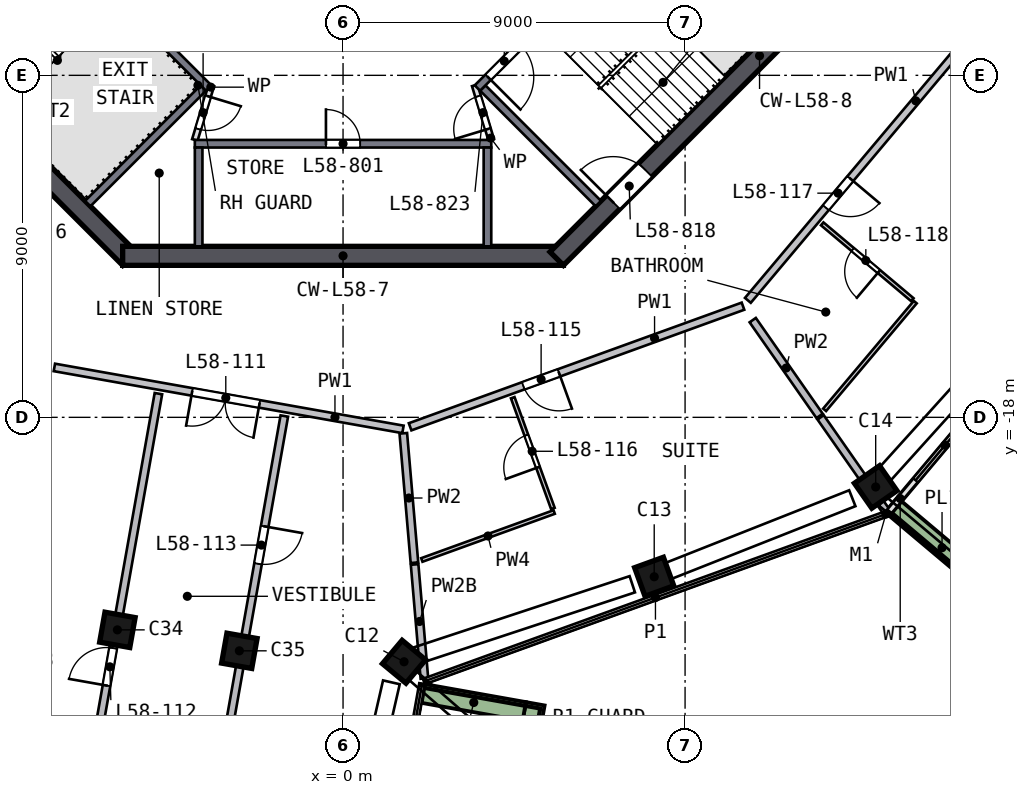
"""IFC4 building model, lengths in metres.
Left out: names, types, materials, properties, quantities, classifications, styles, units other than length and angle.
Written with IfcOpenShell. Run it as: python <this file> out.ifc"""

import sys

from ifc_helpers import new_model, si_unit, direction, frame, frame_2d, origin, origin_2d, place, context, subcontext, project, spatial, rectangle, extrude, element, fill, save


model = new_model("IFC4")
c1 = context("Model", 3, precision=1e-05, world=origin(), true_north=direction((0.0, 1.0)))
c2 = subcontext(c1, "Body", "Model", "MODEL_VIEW")
j1 = project(units=[si_unit("LENGTHUNIT", "METRE"), si_unit("PLANEANGLEUNIT", "RADIAN")], contexts=[c1])
p1 = place(None, origin())
s1 = spatial("IfcSite", under=j1, at=p1, CompositionType="ELEMENT")
p2 = place(p1, origin())
s2 = spatial("IfcBuilding", under=s1, at=p2, CompositionType="ELEMENT")
p3 = place(p2, frame((0.0, 0.0, 237.5)))
s3 = spatial("IfcBuildingStorey", under=s2, at=p3, CompositionType="ELEMENT", Elevation=237.5)
p4 = place(p3, frame((1.465, -24.442, 0.0), z_axis=(0.11614948, 0.007981476, 0.993199675), x_axis=(-0.636262461, -0.76725356, 0.080573294)))
e1 = element("IfcColumn", 1, at=p4, inside=s3, PredefinedType="COLUMN", context=c2, shape_type="SweptSolid", body=[
    extrude(rectangle(XDim=0.8, YDim=0.8, at=origin_2d()), origin(), (0.0, 0.0, 1.0), 3.212),
])
p5 = place(p3, frame((8.061, -22.243, 0.0), z_axis=(0.105478981, 0.039240919, 0.993646987), x_axis=(0.93419489, 0.338548583, -0.112537837)))
e2 = element("IfcColumn", 2, at=p5, inside=s3, PredefinedType="COLUMN", context=c2, shape_type="SweptSolid", body=[
    extrude(rectangle(XDim=0.8, YDim=0.8, at=origin_2d()), origin(), (0.0, 0.0, 1.0), 3.21),
])
for number, where, z_axis, x_axis in (
    (3, (13.902, -19.913, 0.0), (0.094, 0.067, 0.993), (-0.815, -0.568, 0.115)),
    (4, (-6.073, -23.559, 0.0), (0.112, -0.028, 0.993), (-0.176, -0.984, -0.008)),
    (5, (-2.867, -24.129, 0.0), (0.115, -0.013, 0.993), (-0.174, -0.985, 0.008)),
):
    element("IfcColumn", number, at=place(p3, frame(where, z_axis=z_axis, x_axis=x_axis)), inside=s3, PredefinedType="COLUMN", context=c2, shape_type="SweptSolid", body=[
        extrude(rectangle(XDim=0.8, YDim=0.8, at=origin_2d()), origin(), (0.0, 0.0, 1.0), 3.211),
    ])
p6 = place(p3, frame((-13.823, -5.622, 0.0), z_axis=(0.0, 0.0, 1.0), x_axis=(0.707106781, -0.707106781, 0.0)))
e6 = element("IfcWall", 6, at=p6, inside=s3, PredefinedType="SHEAR", context=c2, shape_type="SweptSolid", body=[
    extrude(rectangle(XDim=11.598, YDim=0.5, at=frame_2d((5.799, 0.0))), origin(), (0.0, 0.0, 1.0), 3.5),
])
p7 = place(p6, frame((2.099, 0.0, 0.0)))
e7 = element("IfcOpeningElement", 7, at=p7, cuts=e6, PredefinedType="OPENING", context=c2, shape_type="SweptSolid", body=[
    extrude(rectangle(XDim=1.2, YDim=2.1, at=frame_2d((0.6, 1.05))), frame((0.0, 0.26, 0.0), z_axis=(0.0, -1.0, 0.0), x_axis=(1.0, 0.0, 0.0)), (0.0, 0.0, 1.0), 0.52),
])
p8 = place(p3, frame((-5.799, -13.75, 0.0), z_axis=(0.0, 0.0, 1.0), x_axis=(1.0, 0.0, 0.0)))
e8 = element("IfcWall", 8, at=p8, inside=s3, PredefinedType="SHEAR", context=c2, shape_type="SweptSolid", body=[
    extrude(rectangle(XDim=11.598, YDim=0.5, at=frame_2d((5.799, 0.0))), origin(), (0.0, 0.0, 1.0), 3.5),
])
p9 = place(p3, frame((5.622, -13.823, 0.0), z_axis=(0.0, 0.0, 1.0), x_axis=(0.707106781, 0.707106781, 0.0)))
e9 = element("IfcWall", 9, at=p9, inside=s3, PredefinedType="SHEAR", context=c2, shape_type="SweptSolid", body=[
    extrude(rectangle(XDim=11.598, YDim=0.5, at=frame_2d((5.799, 0.0))), origin(), (0.0, 0.0, 1.0), 3.5),
])
p10 = place(p9, frame((2.099, 0.0, 0.0)))
e10 = element("IfcOpeningElement", 10, at=p10, cuts=e9, PredefinedType="OPENING", context=c2, shape_type="SweptSolid", body=[
    extrude(rectangle(XDim=1.2, YDim=2.1, at=frame_2d((0.6, 1.05))), frame((0.0, 0.26, 0.0), z_axis=(0.0, -1.0, 0.0), x_axis=(1.0, 0.0, 0.0)), (0.0, 0.0, 1.0), 0.52),
])
p11 = place(p3, frame((14.383, -20.467, 0.0), z_axis=(0.0, 0.0, 1.0), x_axis=(0.643863246, 0.765140589, 0.0)))
e11 = element("IfcWall", 11, at=p11, inside=s3, PredefinedType="SOLIDWALL", context=c2, shape_type="SweptSolid", body=[
    extrude(rectangle(XDim=3.863, YDim=0.15, at=frame_2d((1.932, 0.0))), origin(), (0.0, 0.0, 1.0), 2.525),
])
p12 = place(p11, frame((1.063, 0.0, 0.0)))
e12 = element("IfcOpeningElement", 12, at=p12, cuts=e11, PredefinedType="OPENING", context=c2, shape_type="SweptSolid", body=[
    extrude(rectangle(XDim=2.4, YDim=2.4, at=frame_2d((1.2, 1.2))), frame((0.0, 0.085, 0.0), z_axis=(0.0, -1.0, 0.0), x_axis=(1.0, 0.0, 0.0)), (0.0, 0.0, 1.0), 0.17),
])
p13 = place(p3, frame((3.512, -34.238, 0.0), z_axis=(0.0, 0.0, 1.0), x_axis=(0.175030359, 0.984563037, 0.0)))
e13 = element("IfcWall", 13, at=p13, inside=s3, PredefinedType="SOLIDWALL", context=c2, shape_type="SweptSolid", body=[
    extrude(rectangle(XDim=8.836, YDim=0.5, at=frame_2d((4.418, 0.0))), origin(), (0.0, 0.0, 1.0), 0.7),
])
p14 = place(p3, frame((4.769, -25.74, 0.0), z_axis=(0.0, 0.0, 1.0), x_axis=(-0.98456424, 0.175023592, 0.0)))
e14 = element("IfcWall", 14, at=p14, inside=s3, PredefinedType="SOLIDWALL", context=c2, shape_type="SweptSolid", body=[
    extrude(rectangle(XDim=2.699, YDim=0.5, at=frame_2d((1.35, 0.0))), origin(), (0.0, 0.0, 1.0), 0.7),
])
p15 = place(p3, frame((14.538, -20.402, 0.0), z_axis=(0.0, 0.0, 1.0), x_axis=(0.765134779, -0.64387015, 0.0)))
e15 = element("IfcWall", 15, at=p15, inside=s3, PredefinedType="SOLIDWALL", context=c2, shape_type="SweptSolid", body=[
    extrude(rectangle(XDim=3.199, YDim=0.5, at=frame_2d((1.6, 0.0))), origin(), (0.0, 0.0, 1.0), 0.7),
])
p16 = place(p3, frame((-3.9, -10.8, 0.0), z_axis=(0.0, 0.0, 1.0), x_axis=(1.0, 0.0, 0.0)))
e16 = element("IfcWall", 16, at=p16, inside=s3, PredefinedType="SOLIDWALL", context=c2, shape_type="SweptSolid", body=[
    extrude(rectangle(XDim=7.8, YDim=0.2, at=frame_2d((3.9, 0.0))), origin(), (0.0, 0.0, 1.0), 3.19),
])
p17 = place(p16, frame((3.45, 0.0, 0.0)))
e17 = element("IfcOpeningElement", 17, at=p17, cuts=e16, PredefinedType="OPENING", context=c2, shape_type="SweptSolid", body=[
    extrude(rectangle(XDim=0.9, YDim=2.1, at=frame_2d((0.45, 1.05))), frame((0.0, 0.11, 0.0), z_axis=(0.0, -1.0, 0.0), x_axis=(1.0, 0.0, 0.0)), (0.0, 0.0, 1.0), 0.22),
])
for number, where, z_axis, x_axis in (
    (18, (-3.8, -10.9, 0.0), (0.0, 0.0, 1.0), (0.0, -1.0, 0.0)),
    (19, (3.8, -10.9, 0.0), (0.0, 0.0, 1.0), (0.0, -1.0, 0.0)),
):
    element("IfcWall", number, at=place(p3, frame(where, z_axis=z_axis, x_axis=x_axis)), inside=s3, PredefinedType="SOLIDWALL", context=c2, shape_type="SweptSolid", body=[
        extrude(rectangle(XDim=2.6, YDim=0.2, at=frame_2d((1.3, 0.0))), origin(), (0.0, 0.0, 1.0), 3.19),
    ])
p18 = place(p3, frame((-3.535, -9.334, 0.0), z_axis=(0.0, 0.0, 1.0), x_axis=(-0.707120946, 0.707092617, 0.0)))
e20 = element("IfcWall", 20, at=p18, inside=s3, PredefinedType="SOLIDWALL", context=c2, shape_type="SweptSolid", body=[
    extrude(rectangle(XDim=8.618, YDim=0.2, at=frame_2d((4.309, 0.0))), origin(), (0.0, 0.0, 1.0), 3.19),
])
p19 = place(p18, frame((6.6, 0.0, 0.0)))
e21 = element("IfcOpeningElement", 21, at=p19, cuts=e20, PredefinedType="OPENING", context=c2, shape_type="SweptSolid", body=[
    extrude(rectangle(XDim=1.2, YDim=2.1, at=frame_2d((0.6, 1.05))), frame((0.0, 0.11, 0.0), z_axis=(0.0, -1.0, 0.0), x_axis=(1.0, 0.0, 0.0)), (0.0, 0.0, 1.0), 0.22),
])
p20 = place(p3, frame((-3.677, -9.334, 0.0), z_axis=(0.0, 0.0, 1.0), x_axis=(-0.707078393, -0.707135168, 0.0)))
e22 = element("IfcWall", 22, at=p20, inside=s3, PredefinedType="SOLIDWALL", context=c2, shape_type="SweptSolid", body=[
    extrude(rectangle(XDim=4.3, YDim=0.2, at=frame_2d((2.15, 0.0))), origin(), (0.0, 0.0, 1.0), 3.19),
])
p21 = place(p3, frame((9.629, -3.24, 0.0), z_axis=(0.0, 0.0, 1.0), x_axis=(-0.707120946, -0.707092617, 0.0)))
e23 = element("IfcWall", 23, at=p21, inside=s3, PredefinedType="SOLIDWALL", context=c2, shape_type="SweptSolid", body=[
    extrude(rectangle(XDim=8.618, YDim=0.2, at=frame_2d((4.309, 0.0))), origin(), (0.0, 0.0, 1.0), 3.19),
])
p22 = place(p21, frame((7.018, 0.0, 0.0)))
e24 = element("IfcOpeningElement", 24, at=p22, cuts=e23, PredefinedType="OPENING", context=c2, shape_type="SweptSolid", body=[
    extrude(rectangle(XDim=1.2, YDim=2.1, at=frame_2d((0.6, 1.05))), frame((0.0, 0.11, 0.0), z_axis=(0.0, -1.0, 0.0), x_axis=(1.0, 0.0, 0.0)), (0.0, 0.0, 1.0), 0.22),
])
p23 = place(p3, frame((3.677, -9.334, 0.0), z_axis=(0.0, 0.0, 1.0), x_axis=(0.707078393, -0.707135168, 0.0)))
e25 = element("IfcWall", 25, at=p23, inside=s3, PredefinedType="SOLIDWALL", context=c2, shape_type="SweptSolid", body=[
    extrude(rectangle(XDim=4.3, YDim=0.2, at=frame_2d((2.15, 0.0))), origin(), (0.0, 0.0, 1.0), 3.19),
])
p24 = place(p3, frame((-3.465, -9.263, 0.0), z_axis=(0.0, 0.0, 1.0), x_axis=(-0.289808785, -0.957084567, 0.0)))
e26 = element("IfcWall", 26, at=p24, inside=s3, PredefinedType="PARTITIONING", context=c2, shape_type="SweptSolid", body=[
    extrude(rectangle(XDim=1.501, YDim=0.15, at=frame_2d((0.75, 0.0))), origin(), (0.0, 0.0, 1.0), 3.19),
])
p25 = place(p24, frame((0.301, 0.0, 0.0)))
e27 = element("IfcOpeningElement", 27, at=p25, cuts=e26, PredefinedType="OPENING", context=c2, shape_type="SweptSolid", body=[
    extrude(rectangle(XDim=0.9, YDim=2.1, at=frame_2d((0.45, 1.05))), frame((0.0, 0.085, 0.0), z_axis=(0.0, -1.0, 0.0), x_axis=(1.0, 0.0, 0.0)), (0.0, 0.0, 1.0), 0.17),
])
p26 = place(p3, frame((3.9, -10.7, 0.0), z_axis=(0.0, 0.0, 1.0), x_axis=(-0.289808785, 0.957084567, 0.0)))
e28 = element("IfcWall", 28, at=p26, inside=s3, PredefinedType="PARTITIONING", context=c2, shape_type="SweptSolid", body=[
    extrude(rectangle(XDim=1.501, YDim=0.15, at=frame_2d((0.75, 0.0))), origin(), (0.0, 0.0, 1.0), 3.19),
])
p27 = place(p26, frame((0.301, 0.0, 0.0)))
e29 = element("IfcOpeningElement", 29, at=p27, cuts=e28, PredefinedType="OPENING", context=c2, shape_type="SweptSolid", body=[
    extrude(rectangle(XDim=0.9, YDim=2.1, at=frame_2d((0.45, 1.05))), frame((0.0, 0.085, 0.0), z_axis=(0.0, -1.0, 0.0), x_axis=(1.0, 0.0, 0.0)), (0.0, 0.0, 1.0), 0.17),
])
p28 = place(p3, frame((1.577, -18.317, 0.0), z_axis=(0.0, 0.0, 1.0), x_axis=(-0.984565418, 0.175016965, 0.0)))
e30 = element("IfcWall", 30, at=p28, inside=s3, PredefinedType="SOLIDWALL", context=c2, shape_type="SweptSolid", body=[
    extrude(rectangle(XDim=9.317, YDim=0.2, at=frame_2d((4.658, 0.0))), origin(), (0.0, 0.0, 1.0), 3.19),
])
p29 = place(p28, frame((3.835, 0.0, 0.0)))
e31 = element("IfcOpeningElement", 31, at=p29, cuts=e30, PredefinedType="OPENING", context=c2, shape_type="SweptSolid", body=[
    extrude(rectangle(XDim=1.8, YDim=2.1, at=frame_2d((0.9, 1.05))), frame((0.0, 0.11, 0.0), z_axis=(0.0, -1.0, 0.0), x_axis=(1.0, 0.0, 0.0)), (0.0, 0.0, 1.0), 0.22),
])
p30 = place(p3, frame((10.524, -15.075, 0.0), z_axis=(0.0, 0.0, 1.0), x_axis=(-0.940173108, -0.34069712, 0.0)))
e32 = element("IfcWall", 32, at=p30, inside=s3, PredefinedType="SOLIDWALL", context=c2, shape_type="SweptSolid", body=[
    extrude(rectangle(XDim=9.316, YDim=0.2, at=frame_2d((4.658, 0.0))), origin(), (0.0, 0.0, 1.0), 3.19),
])
p31 = place(p30, frame((5.15, 0.0, 0.0)))
e33 = element("IfcOpeningElement", 33, at=p31, cuts=e32, PredefinedType="OPENING", context=c2, shape_type="SweptSolid", body=[
    extrude(rectangle(XDim=1.0, YDim=2.1, at=frame_2d((0.5, 1.05))), frame((0.0, 0.11, 0.0), z_axis=(0.0, -1.0, 0.0), x_axis=(1.0, 0.0, 0.0)), (0.0, 0.0, 1.0), 0.22),
])
p32 = place(p3, frame((16.664, -7.778, 0.0), z_axis=(0.0, 0.0, 1.0), x_axis=(-0.643849849, -0.765151862, 0.0)))
e34 = element("IfcWall", 34, at=p32, inside=s3, PredefinedType="SOLIDWALL", context=c2, shape_type="SweptSolid", body=[
    extrude(rectangle(XDim=9.337, YDim=0.2, at=frame_2d((4.668, 0.0))), origin(), (0.0, 0.0, 1.0), 3.19),
])
p33 = place(p32, frame((5.15, 0.0, 0.0)))
e35 = element("IfcOpeningElement", 35, at=p33, cuts=e34, PredefinedType="OPENING", context=c2, shape_type="SweptSolid", body=[
    extrude(rectangle(XDim=1.0, YDim=2.1, at=frame_2d((0.5, 1.05))), frame((0.0, 0.11, 0.0), z_axis=(0.0, -1.0, 0.0), x_axis=(1.0, 0.0, 0.0)), (0.0, 0.0, 1.0), 0.22),
])
p34 = place(p3, frame((-6.662, -27.519, 0.0), z_axis=(0.0, 0.0, 1.0), x_axis=(0.175034356, 0.984562326, 0.0)))
e36 = element("IfcWall", 36, at=p34, inside=s3, PredefinedType="SOLIDWALL", context=c2, shape_type="SweptSolid", body=[
    extrude(rectangle(XDim=10.302, YDim=0.2, at=frame_2d((5.151, 0.0))), origin(), (0.0, 0.0, 1.0), 3.19),
])
p35 = place(p34, frame((2.5, 0.0, 0.0)))
e37 = element("IfcOpeningElement", 37, at=p35, cuts=e36, PredefinedType="OPENING", context=c2, shape_type="SweptSolid", body=[
    extrude(rectangle(XDim=1.0, YDim=2.1, at=frame_2d((0.5, 1.05))), frame((0.0, 0.11, 0.0), z_axis=(0.0, -1.0, 0.0), x_axis=(1.0, 0.0, 0.0)), (0.0, 0.0, 1.0), 0.22),
])
p36 = place(p3, frame((-1.545, -17.965, 0.0), z_axis=(0.0, 0.0, 1.0), x_axis=(-0.175011383, -0.98456641, 0.0)))
e38 = element("IfcWall", 38, at=p36, inside=s3, PredefinedType="SOLIDWALL", context=c2, shape_type="SweptSolid", body=[
    extrude(rectangle(XDim=10.302, YDim=0.2, at=frame_2d((5.151, 0.0))), origin(), (0.0, 0.0, 1.0), 3.19),
])
p37 = place(p36, frame((2.95, 0.0, 0.0)))
e39 = element("IfcOpeningElement", 39, at=p37, cuts=e38, PredefinedType="OPENING", context=c2, shape_type="SweptSolid", body=[
    extrude(rectangle(XDim=1.0, YDim=2.1, at=frame_2d((0.5, 1.05))), frame((0.0, 0.11, 0.0), z_axis=(0.0, -1.0, 0.0), x_axis=(1.0, 0.0, 0.0)), (0.0, 0.0, 1.0), 0.22),
])
p38 = place(p3, frame((1.586, -18.42, 0.0), z_axis=(0.0, 0.0, 1.0), x_axis=(0.08577589, -0.996314457, 0.0)))
e40 = element("IfcWall", 40, at=p38, inside=s3, PredefinedType="SOLIDWALL", context=c2, shape_type="SweptSolid", body=[
    extrude(rectangle(XDim=3.418, YDim=0.2, at=frame_2d((1.709, 0.0))), origin(), (0.0, 0.0, 1.0), 3.19),
])
p39 = place(p3, frame((1.883, -21.872, 0.0), z_axis=(0.0, 0.0, 1.0), x_axis=(0.085775953, -0.996314451, 0.0)))
e41 = element("IfcWall", 41, at=p39, inside=s3, PredefinedType="SOLIDWALL", context=c2, shape_type="SweptSolid", body=[
    extrude(rectangle(XDim=3.011, YDim=0.2, at=frame_2d((1.506, 0.0))), origin(), (0.0, 0.0, 1.0), 2.69),
])
p40 = place(p3, frame((10.78, -15.441, 0.0), z_axis=(0.0, 0.0, 1.0), x_axis=(0.572438677, -0.819947535, 0.0)))
e42 = element("IfcWall", 42, at=p40, inside=s3, PredefinedType="SOLIDWALL", context=c2, shape_type="SweptSolid", body=[
    extrude(rectangle(XDim=3.074, YDim=0.2, at=frame_2d((1.537, 0.0))), origin(), (0.0, 0.0, 1.0), 3.19),
])
p41 = place(p3, frame((12.566, -18.0, 0.0), z_axis=(0.0, 0.0, 1.0), x_axis=(0.572438994, -0.819947314, 0.0)))
e43 = element("IfcWall", 43, at=p41, inside=s3, PredefinedType="SOLIDWALL", context=c2, shape_type="SweptSolid", body=[
    extrude(rectangle(XDim=3.011, YDim=0.2, at=frame_2d((1.506, 0.0))), origin(), (0.0, 0.0, 1.0), 3.19),
])
p42 = place(p3, frame((5.556, -20.491, 0.0), z_axis=(0.0, 0.0, 1.0), x_axis=(-0.940171961, -0.340700285, 0.0)))
e44 = element("IfcWall", 44, at=p42, inside=s3, PredefinedType="PARTITIONING", context=c2, shape_type="SweptSolid", body=[
    extrude(rectangle(XDim=3.704, YDim=0.1, at=frame_2d((1.852, 0.0))), origin(), (0.0, 0.0, 1.0), 3.19),
])
p43 = place(p3, frame((5.521, -20.397, 0.0), z_axis=(0.0, 0.0, 1.0), x_axis=(-0.340693169, 0.940174539, 0.0)))
e45 = element("IfcWall", 45, at=p43, inside=s3, PredefinedType="PARTITIONING", context=c2, shape_type="SweptSolid", body=[
    extrude(rectangle(XDim=3.1, YDim=0.1, at=frame_2d((1.55, 0.0))), origin(), (0.0, 0.0, 1.0), 3.19),
])
p44 = place(p43, frame((1.15, 0.0, 0.0)))
e46 = element("IfcOpeningElement", 46, at=p44, cuts=e45, PredefinedType="OPENING", context=c2, shape_type="SweptSolid", body=[
    extrude(rectangle(XDim=0.9, YDim=2.1, at=frame_2d((0.45, 1.05))), frame((0.0, 0.06, 0.0), z_axis=(0.0, -1.0, 0.0), x_axis=(1.0, 0.0, 0.0)), (0.0, 0.0, 1.0), 0.12),
])
p45 = place(p3, frame((14.981, -14.904, 0.0), z_axis=(0.0, 0.0, 1.0), x_axis=(-0.765178668, 0.643817992, 0.0)))
e47 = element("IfcWall", 47, at=p45, inside=s3, PredefinedType="PARTITIONING", context=c2, shape_type="SweptSolid", body=[
    extrude(rectangle(XDim=3.1, YDim=0.1, at=frame_2d((1.55, 0.0))), origin(), (0.0, 0.0, 1.0), 3.19),
])
p46 = place(p45, frame((1.15, 0.0, 0.0)))
e48 = element("IfcOpeningElement", 48, at=p46, cuts=e47, PredefinedType="OPENING", context=c2, shape_type="SweptSolid", body=[
    extrude(rectangle(XDim=0.9, YDim=2.1, at=frame_2d((0.45, 1.05))), frame((0.0, 0.06, 0.0), z_axis=(0.0, -1.0, 0.0), x_axis=(1.0, 0.0, 0.0)), (0.0, 0.0, 1.0), 0.12),
])
p47 = place(p3, frame((15.057, -14.968, 0.0), z_axis=(0.0, 0.0, 1.0), x_axis=(-0.643827179, -0.765170938, 0.0)))
e49 = element("IfcWall", 49, at=p47, inside=s3, PredefinedType="PARTITIONING", context=c2, shape_type="SweptSolid", body=[
    extrude(rectangle(XDim=3.704, YDim=0.1, at=frame_2d((1.852, 0.0))), origin(), (0.0, 0.0, 1.0), 3.19),
])
p48 = place(p12, origin())
e50 = element("IfcDoor", 50, at=p48, inside=s3, OperationType="SLIDING_TO_LEFT", PredefinedType="DOOR", context=c2, shape_type="SweptSolid", body=[
    extrude(rectangle(XDim=2.4, YDim=2.4, at=frame_2d((1.2, 1.2))), frame((0.0, 0.025, 0.0), z_axis=(0.0, -1.0, 0.0), x_axis=(1.0, 0.0, 0.0)), (0.0, 0.0, 1.0), 0.05),
])
fill(e12, e50)
p49 = place(p17, origin())
e51 = element("IfcDoor", 51, at=p49, inside=s3, OperationType="SINGLE_SWING_LEFT", PredefinedType="DOOR", context=c2, shape_type="SweptSolid", body=[
    extrude(rectangle(XDim=0.9, YDim=2.1, at=frame_2d((0.45, 1.05))), frame((0.0, 0.025, 0.0), z_axis=(0.0, -1.0, 0.0), x_axis=(1.0, 0.0, 0.0)), (0.0, 0.0, 1.0), 0.05),
])
fill(e17, e51)
p50 = place(p22, origin())
e52 = element("IfcDoor", 52, at=p50, inside=s3, OperationType="SINGLE_SWING_RIGHT", PredefinedType="DOOR", context=c2, shape_type="SweptSolid", body=[
    extrude(rectangle(XDim=1.2, YDim=2.1, at=frame_2d((0.6, 1.05))), frame((0.0, 0.025, 0.0), z_axis=(0.0, -1.0, 0.0), x_axis=(1.0, 0.0, 0.0)), (0.0, 0.0, 1.0), 0.05),
])
fill(e24, e52)
p51 = place(p10, origin())
e53 = element("IfcDoor", 53, at=p51, inside=s3, OperationType="SINGLE_SWING_LEFT", PredefinedType="DOOR", context=c2, shape_type="SweptSolid", body=[
    extrude(rectangle(XDim=1.2, YDim=2.1, at=frame_2d((0.6, 1.05))), frame((0.0, 0.025, 0.0), z_axis=(0.0, -1.0, 0.0), x_axis=(1.0, 0.0, 0.0)), (0.0, 0.0, 1.0), 0.05),
])
fill(e10, e53)
p52 = place(p25, origin())
e54 = element("IfcDoor", 54, at=p52, inside=s3, OperationType="SINGLE_SWING_LEFT", PredefinedType="DOOR", context=c2, shape_type="SweptSolid", body=[
    extrude(rectangle(XDim=0.9, YDim=2.1, at=frame_2d((0.45, 1.05))), frame((0.0, 0.025, 0.0), z_axis=(0.0, -1.0, 0.0), x_axis=(1.0, 0.0, 0.0)), (0.0, 0.0, 1.0), 0.05),
])
fill(e27, e54)
p53 = place(p27, origin())
e55 = element("IfcDoor", 55, at=p53, inside=s3, OperationType="SINGLE_SWING_LEFT", PredefinedType="DOOR", context=c2, shape_type="SweptSolid", body=[
    extrude(rectangle(XDim=0.9, YDim=2.1, at=frame_2d((0.45, 1.05))), frame((0.0, 0.025, 0.0), z_axis=(0.0, -1.0, 0.0), x_axis=(1.0, 0.0, 0.0)), (0.0, 0.0, 1.0), 0.05),
])
fill(e29, e55)
p54 = place(p29, origin())
e56 = element("IfcDoor", 56, at=p54, inside=s3, OperationType="DOUBLE_DOOR_SINGLE_SWING", PredefinedType="DOOR", context=c2, shape_type="SweptSolid", body=[
    extrude(rectangle(XDim=1.8, YDim=2.1, at=frame_2d((0.9, 1.05))), frame((0.0, 0.025, 0.0), z_axis=(0.0, -1.0, 0.0), x_axis=(1.0, 0.0, 0.0)), (0.0, 0.0, 1.0), 0.05),
])
fill(e31, e56)
p55 = place(p35, origin())
e57 = element("IfcDoor", 57, at=p55, inside=s3, OperationType="SINGLE_SWING_LEFT", PredefinedType="DOOR", context=c2, shape_type="SweptSolid", body=[
    extrude(rectangle(XDim=1.0, YDim=2.1, at=frame_2d((0.5, 1.05))), frame((0.0, 0.025, 0.0), z_axis=(0.0, -1.0, 0.0), x_axis=(1.0, 0.0, 0.0)), (0.0, 0.0, 1.0), 0.05),
])
fill(e37, e57)
p56 = place(p37, origin())
e58 = element("IfcDoor", 58, at=p56, inside=s3, OperationType="SINGLE_SWING_LEFT", PredefinedType="DOOR", context=c2, shape_type="SweptSolid", body=[
    extrude(rectangle(XDim=1.0, YDim=2.1, at=frame_2d((0.5, 1.05))), frame((0.0, 0.025, 0.0), z_axis=(0.0, -1.0, 0.0), x_axis=(1.0, 0.0, 0.0)), (0.0, 0.0, 1.0), 0.05),
])
fill(e39, e58)
p57 = place(p31, origin())
e59 = element("IfcDoor", 59, at=p57, inside=s3, OperationType="SINGLE_SWING_LEFT", PredefinedType="DOOR", context=c2, shape_type="SweptSolid", body=[
    extrude(rectangle(XDim=1.0, YDim=2.1, at=frame_2d((0.5, 1.05))), frame((0.0, 0.025, 0.0), z_axis=(0.0, -1.0, 0.0), x_axis=(1.0, 0.0, 0.0)), (0.0, 0.0, 1.0), 0.05),
])
fill(e33, e59)
p58 = place(p44, origin())
e60 = element("IfcDoor", 60, at=p58, inside=s3, OperationType="SINGLE_SWING_LEFT", PredefinedType="DOOR", context=c2, shape_type="SweptSolid", body=[
    extrude(rectangle(XDim=0.9, YDim=2.1, at=frame_2d((0.45, 1.05))), frame((0.0, 0.025, 0.0), z_axis=(0.0, -1.0, 0.0), x_axis=(1.0, 0.0, 0.0)), (0.0, 0.0, 1.0), 0.05),
])
fill(e46, e60)
p59 = place(p33, origin())
e61 = element("IfcDoor", 61, at=p59, inside=s3, OperationType="SINGLE_SWING_LEFT", PredefinedType="DOOR", context=c2, shape_type="SweptSolid", body=[
    extrude(rectangle(XDim=1.0, YDim=2.1, at=frame_2d((0.5, 1.05))), frame((0.0, 0.025, 0.0), z_axis=(0.0, -1.0, 0.0), x_axis=(1.0, 0.0, 0.0)), (0.0, 0.0, 1.0), 0.05),
])
fill(e35, e61)
p60 = place(p46, origin())
e62 = element("IfcDoor", 62, at=p60, inside=s3, OperationType="SINGLE_SWING_LEFT", PredefinedType="DOOR", context=c2, shape_type="SweptSolid", body=[
    extrude(rectangle(XDim=0.9, YDim=2.1, at=frame_2d((0.45, 1.05))), frame((0.0, 0.025, 0.0), z_axis=(0.0, -1.0, 0.0), x_axis=(1.0, 0.0, 0.0)), (0.0, 0.0, 1.0), 0.05),
])
fill(e48, e62)
save(model, sys.argv[1])
